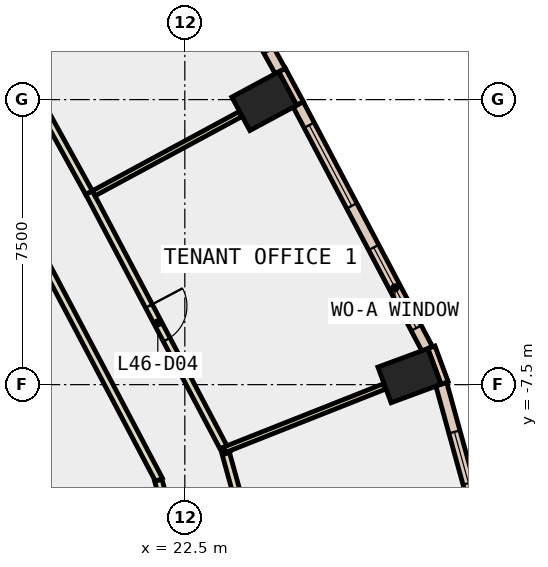
"""IFC4 building model, lengths in metres.
Left out: names, types, materials, properties, quantities, classifications, styles, units other than length and angle.
Written with IfcOpenShell. Run it as: python <this file> out.ifc"""

import sys

from ifc_helpers import new_model, si_unit, direction, frame, frame_2d, origin, origin_2d, place, context, subcontext, project, spatial, rectangle, extrude, element, fill, save


model = new_model("IFC4")
c1 = context("Model", 3, precision=1e-05, world=origin(), true_north=direction((0.0, 1.0)))
c2 = subcontext(c1, "Body", "Model", "MODEL_VIEW")
j1 = project(units=[si_unit("LENGTHUNIT", "METRE"), si_unit("PLANEANGLEUNIT", "RADIAN")], contexts=[c1])
p1 = place(None, origin())
s1 = spatial("IfcSite", under=j1, at=p1, CompositionType="ELEMENT")
p2 = place(p1, origin())
s2 = spatial("IfcBuilding", under=s1, at=p2, CompositionType="ELEMENT")
p3 = place(p2, frame((0.0, 0.0, 206.6)))
s3 = spatial("IfcBuildingStorey", under=s2, at=p3, CompositionType="ELEMENT", Elevation=206.6)
for number, where, z_axis, x_axis in (
    (1, (28.412, -7.264, -0.4), (0.0, 0.0, 1.0), (-0.347, 0.938, 0.0)),
    (2, (24.591, -0.042, -0.4), (0.0, 0.0, 1.0), (-0.474, 0.88, 0.0)),
):
    element("IfcColumn", number, at=place(p3, frame(where, z_axis=z_axis, x_axis=x_axis)), inside=s3, PredefinedType="COLUMN", context=c2, shape_type="SweptSolid", body=[
        extrude(rectangle(XDim=1.0, YDim=1.4, at=origin_2d()), origin(), (0.0, 0.0, 1.0), 4.2),
    ])
p4 = place(p3, frame((29.336, -7.456, 0.0), z_axis=(0.0, 0.0, 1.0), x_axis=(-0.346892928577, 0.937904737222, 0.0)))
e3 = element("IfcWall", 3, at=p4, inside=s3, PredefinedType="STANDARD", context=c2, shape_type="SweptSolid", body=[
    extrude(rectangle(XDim=1.0, YDim=0.2, at=frame_2d((0.5, 0.0))), origin(), (0.0, 0.0, 1.0), 3.8),
])
p5 = place(p3, frame((25.532, -0.103, 0.0), z_axis=(0.0, 0.0, 1.0), x_axis=(-0.473663196434, 0.88070606694, 0.0)))
e4 = element("IfcWall", 4, at=p5, inside=s3, PredefinedType="STANDARD", context=c2, shape_type="SweptSolid", body=[
    extrude(rectangle(XDim=1.0, YDim=0.2, at=frame_2d((0.5, 0.0))), origin(), (0.0, 0.0, 1.0), 3.8),
])
p6 = place(p3, frame((30.312, -11.35, 0.0), z_axis=(0.0, 0.0, 1.0), x_axis=(-0.265534577923, 0.96410133696, 0.0)))
e5 = element("IfcWall", 5, at=p6, inside=s3, PredefinedType="STANDARD", context=c2, shape_type="SweptSolid", body=[
    extrude(rectangle(XDim=4.007, YDim=0.3, at=frame_2d((2.003, 0.0))), origin(), (0.0, 0.0, 1.0), 3.8),
])
p7 = place(p6, frame((1.303, 0.0, 0.9)))
e6 = element("IfcOpeningElement", 6, at=p7, cuts=e5, PredefinedType="OPENING", context=c2, shape_type="SweptSolid", body=[
    extrude(rectangle(XDim=1.4, YDim=2.6, at=frame_2d((0.7, 1.3))), frame((0.0, 0.16, 0.0), z_axis=(0.0, -1.0, 0.0), x_axis=(1.0, 0.0, 0.0)), (0.0, 0.0, 1.0), 0.32),
])
p8 = place(p3, frame((28.879, -6.559, 0.0), z_axis=(0.0, 0.0, 1.0), x_axis=(-0.466789249342, 0.884368586449, 0.0)))
e7 = element("IfcWall", 7, at=p8, inside=s3, PredefinedType="STANDARD", context=c2, shape_type="SweptSolid", body=[
    extrude(rectangle(XDim=7.273, YDim=0.3, at=frame_2d((3.637, 0.0))), origin(), (0.0, 0.0, 1.0), 3.8),
])
p9 = place(p8, frame((0.618, 0.0, 0.9)))
e8 = element("IfcOpeningElement", 8, at=p9, cuts=e7, PredefinedType="OPENING", context=c2, shape_type="SweptSolid", body=[
    extrude(rectangle(XDim=2.4, YDim=2.6, at=frame_2d((1.2, 1.3))), frame((0.0, 0.16, 0.0), z_axis=(0.0, -1.0, 0.0), x_axis=(1.0, 0.0, 0.0)), (0.0, 0.0, 1.0), 0.32),
])
p10 = place(p8, frame((4.255, 0.0, 0.9)))
e9 = element("IfcOpeningElement", 9, at=p10, cuts=e7, PredefinedType="OPENING", context=c2, shape_type="SweptSolid", body=[
    extrude(rectangle(XDim=2.4, YDim=2.6, at=frame_2d((1.2, 1.3))), frame((0.0, 0.16, 0.0), z_axis=(0.0, -1.0, 0.0), x_axis=(1.0, 0.0, 0.0)), (0.0, 0.0, 1.0), 0.32),
])
p11 = place(p3, frame((25.01, 0.751, 0.0), z_axis=(0.0, 0.0, 1.0), x_axis=(-0.483590905878, 0.875294142419, 0.0)))
e10 = element("IfcWall", 10, at=p11, inside=s3, PredefinedType="STANDARD", context=c2, shape_type="SweptSolid", body=[
    extrude(rectangle(XDim=7.238, YDim=0.3, at=frame_2d((3.619, 0.0))), origin(), (0.0, 0.0, 1.0), 3.8),
])
p12 = place(p11, frame((0.609, 0.0, 0.9)))
e11 = element("IfcOpeningElement", 11, at=p12, cuts=e10, PredefinedType="OPENING", context=c2, shape_type="SweptSolid", body=[
    extrude(rectangle(XDim=2.4, YDim=2.6, at=frame_2d((1.2, 1.3))), frame((0.0, 0.16, 0.0), z_axis=(0.0, -1.0, 0.0), x_axis=(1.0, 0.0, 0.0)), (0.0, 0.0, 1.0), 0.32),
])
p13 = place(p11, frame((4.228, 0.0, 0.9)))
e12 = element("IfcOpeningElement", 12, at=p13, cuts=e10, PredefinedType="OPENING", context=c2, shape_type="SweptSolid", body=[
    extrude(rectangle(XDim=2.4, YDim=2.6, at=frame_2d((1.2, 1.3))), frame((0.0, 0.16, 0.0), z_axis=(0.0, -1.0, 0.0), x_axis=(1.0, 0.0, 0.0)), (0.0, 0.0, 1.0), 0.32),
])
p14 = place(p3, frame((22.35, -12.006, 0.0), z_axis=(0.0, 0.0, 1.0), x_axis=(-0.265584627827, 0.964087550725, 0.0)))
e13 = element("IfcWall", 13, at=p14, inside=s3, PredefinedType="PARTITIONING", context=c2, shape_type="SweptSolid", body=[
    extrude(rectangle(XDim=2.067, YDim=0.2, at=frame_2d((1.034, 0.0))), origin(), (0.0, 0.0, 1.0), 3.8),
])
p15 = place(p3, frame((21.821, -10.005, 0.0), z_axis=(0.0, 0.0, 1.0), x_axis=(-0.466770012358, 0.884378739887, 0.0)))
e14 = element("IfcWall", 14, at=p15, inside=s3, PredefinedType="PARTITIONING", context=c2, shape_type="SweptSolid", body=[
    extrude(rectangle(XDim=7.449, YDim=0.2, at=frame_2d((3.725, 0.0))), origin(), (0.0, 0.0, 1.0), 3.8),
])
p16 = place(p3, frame((23.578, -9.309, 0.0), z_axis=(0.0, 0.0, 1.0), x_axis=(0.265884037198, -0.964005020092, 0.0)))
e15 = element("IfcWall", 15, at=p16, inside=s3, PredefinedType="PARTITIONING", context=c2, shape_type="SweptSolid", body=[
    extrude(rectangle(XDim=2.784, YDim=0.2, at=frame_2d((1.392, 0.0))), origin(), (0.0, 0.0, 1.0), 3.8),
])
p17 = place(p3, frame((19.98, -2.448, 0.0), z_axis=(0.0, 0.0, 1.0), x_axis=(0.466864023915, -0.884329114738, 0.0)))
e16 = element("IfcWall", 16, at=p17, inside=s3, PredefinedType="PARTITIONING", context=c2, shape_type="SweptSolid", body=[
    extrude(rectangle(XDim=7.75, YDim=0.2, at=frame_2d((3.875, 0.0))), origin(), (0.0, 0.0, 1.0), 3.8),
])
p18 = place(p17, frame((3.375, 0.0, 0.0)))
e17 = element("IfcOpeningElement", 17, at=p18, cuts=e16, PredefinedType="OPENING", context=c2, shape_type="SweptSolid", body=[
    extrude(rectangle(XDim=1.0, YDim=2.1, at=frame_2d((0.5, 1.05))), frame((0.0, 0.11, 0.0), z_axis=(0.0, -1.0, 0.0), x_axis=(1.0, 0.0, 0.0)), (0.0, 0.0, 1.0), 0.22),
])
p19 = place(p3, frame((16.051, 4.663, 0.0), z_axis=(0.0, 0.0, 1.0), x_axis=(0.483513440344, -0.875336936846, 0.0)))
e18 = element("IfcWall", 18, at=p19, inside=s3, PredefinedType="PARTITIONING", context=c2, shape_type="SweptSolid", body=[
    extrude(rectangle(XDim=8.124, YDim=0.2, at=frame_2d((4.062, 0.0))), origin(), (0.0, 0.0, 1.0), 3.8),
])
p20 = place(p19, frame((3.637, 0.0, 0.0)))
e19 = element("IfcOpeningElement", 19, at=p20, cuts=e18, PredefinedType="OPENING", context=c2, shape_type="SweptSolid", body=[
    extrude(rectangle(XDim=1.0, YDim=2.1, at=frame_2d((0.5, 1.05))), frame((0.0, 0.11, 0.0), z_axis=(0.0, -1.0, 0.0), x_axis=(1.0, 0.0, 0.0)), (0.0, 0.0, 1.0), 0.22),
])
p21 = place(p3, frame((23.552, -9.212, 0.0), z_axis=(0.0, 0.0, 1.0), x_axis=(0.929720624715, 0.368265610639, 0.0)))
e20 = element("IfcWall", 20, at=p21, inside=s3, PredefinedType="PARTITIONING", context=c2, shape_type="SweptSolid", body=[
    extrude(rectangle(XDim=4.515, YDim=0.15, at=frame_2d((2.258, 0.0))), origin(), (0.0, 0.0, 1.0), 3.8),
])
p22 = place(p3, frame((20.103, -2.466, 0.0), z_axis=(0.0, 0.0, 1.0), x_axis=(0.879965969606, 0.475036727354, 0.0)))
e21 = element("IfcWall", 21, at=p22, inside=s3, PredefinedType="PARTITIONING", context=c2, shape_type="SweptSolid", body=[
    extrude(rectangle(XDim=4.381, YDim=0.15, at=frame_2d((2.19, 0.0))), origin(), (0.0, 0.0, 1.0), 3.8),
])
p23 = place(p7, origin())
e22 = element("IfcWindow", 22, at=p23, inside=s3, PartitioningType="SINGLE_PANEL", PredefinedType="WINDOW", context=c2, shape_type="SweptSolid", body=[
    extrude(rectangle(XDim=1.4, YDim=2.6, at=frame_2d((0.7, 1.3))), frame((0.0, 0.03, 0.0), z_axis=(0.0, -1.0, 0.0), x_axis=(1.0, 0.0, 0.0)), (0.0, 0.0, 1.0), 0.06),
])
fill(e6, e22)
p24 = place(p9, origin())
e23 = element("IfcWindow", 23, at=p24, inside=s3, PartitioningType="SINGLE_PANEL", PredefinedType="WINDOW", context=c2, shape_type="SweptSolid", body=[
    extrude(rectangle(XDim=2.4, YDim=2.6, at=frame_2d((1.2, 1.3))), frame((0.0, 0.03, 0.0), z_axis=(0.0, -1.0, 0.0), x_axis=(1.0, 0.0, 0.0)), (0.0, 0.0, 1.0), 0.06),
])
fill(e8, e23)
p25 = place(p10, origin())
e24 = element("IfcWindow", 24, at=p25, inside=s3, PartitioningType="SINGLE_PANEL", PredefinedType="WINDOW", context=c2, shape_type="SweptSolid", body=[
    extrude(rectangle(XDim=2.4, YDim=2.6, at=frame_2d((1.2, 1.3))), frame((0.0, 0.03, 0.0), z_axis=(0.0, -1.0, 0.0), x_axis=(1.0, 0.0, 0.0)), (0.0, 0.0, 1.0), 0.06),
])
fill(e9, e24)
p26 = place(p18, origin())
e25 = element("IfcDoor", 25, at=p26, inside=s3, OperationType="SINGLE_SWING_LEFT", PredefinedType="DOOR", context=c2, shape_type="SweptSolid", body=[
    extrude(rectangle(XDim=1.0, YDim=2.1, at=frame_2d((0.5, 1.05))), frame((0.0, 0.025, 0.0), z_axis=(0.0, -1.0, 0.0), x_axis=(1.0, 0.0, 0.0)), (0.0, 0.0, 1.0), 0.05),
])
fill(e17, e25)
save(model, sys.argv[1])
